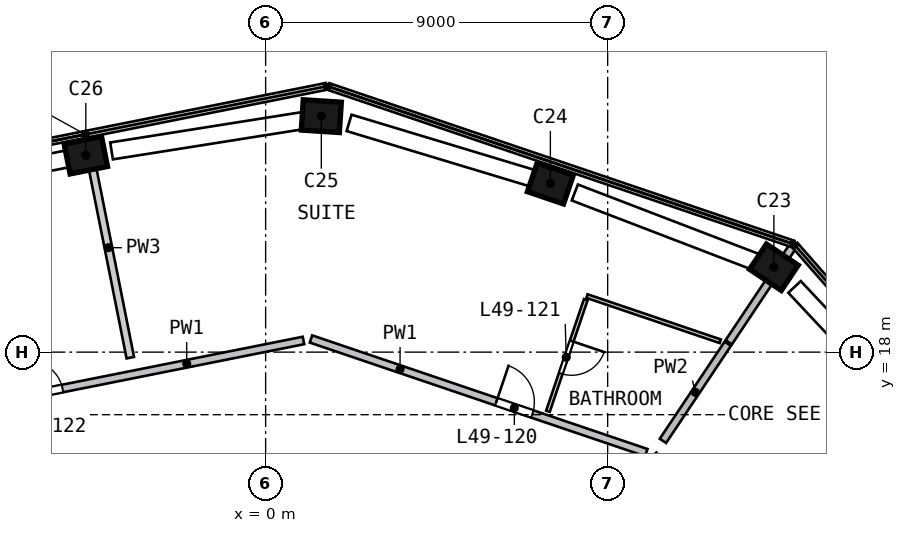
"""IFC4 building model, lengths in metres.
Left out: names, types, materials, properties, quantities, classifications, styles, units other than length and angle.
Written with IfcOpenShell. Run it as: python <this file> out.ifc"""

import sys

from ifc_helpers import new_model, si_unit, direction, frame, frame_2d, origin, origin_2d, place, context, subcontext, project, spatial, rectangle, extrude, element, fill, save


model = new_model("IFC4")
c1 = context("Model", 3, precision=1e-05, world=origin(), true_north=direction((0.0, 1.0)))
c2 = subcontext(c1, "Body", "Model", "MODEL_VIEW")
j1 = project(units=[si_unit("LENGTHUNIT", "METRE"), si_unit("PLANEANGLEUNIT", "RADIAN")], contexts=[c1])
p1 = place(None, origin())
s1 = spatial("IfcSite", under=j1, at=p1, CompositionType="ELEMENT")
p2 = place(p1, origin())
s2 = spatial("IfcBuilding", under=s1, at=p2, CompositionType="ELEMENT")
p3 = place(p2, frame((0.0, 0.0, 201.0)))
s3 = spatial("IfcBuildingStorey", under=s2, at=p3, CompositionType="ELEMENT", Elevation=201.0)
p4 = place(p3, frame((13.465, 20.174, 0.0), z_axis=(-0.075209821, 0.049269396, 0.995949803), x_axis=(0.828464484, -0.552777696, 0.089907833)))
e1 = element("IfcColumn", 1, at=p4, inside=s3, PredefinedType="COLUMN", context=c2, shape_type="SweptSolid", body=[
    extrude(rectangle(XDim=1.0, YDim=0.8, at=origin_2d()), origin(), (0.0, 0.0, 1.0), 4.207),
])
p5 = place(p3, frame((7.593, 22.407, 0.0), z_axis=(-0.083350423, 0.027454561, 0.996142035), x_axis=(-0.943472661, 0.319622961, -0.0877525)))
e2 = element("IfcColumn", 2, at=p5, inside=s3, PredefinedType="COLUMN", context=c2, shape_type="SweptSolid", body=[
    extrude(rectangle(XDim=1.0, YDim=0.8, at=origin_2d()), origin(), (0.0, 0.0, 1.0), 4.206),
])
p6 = place(p3, frame((1.574, 24.204, 0.0), z_axis=(-0.089833403, 0.005106808, 0.995943713), x_axis=(0.993825699, -0.064922521, 0.089975257)))
e3 = element("IfcColumn", 3, at=p6, inside=s3, PredefinedType="COLUMN", context=c2, shape_type="SweptSolid", body=[
    extrude(rectangle(XDim=1.0, YDim=0.8, at=origin_2d()), origin(), (0.0, 0.0, 1.0), 4.207),
])
p7 = place(p3, frame((-4.628, 23.201, 0.0), z_axis=(-0.085904417, -0.017877406, 0.996142976), x_axis=(-0.976927418, -0.194715676, -0.087741814)))
e4 = element("IfcColumn", 4, at=p7, inside=s3, PredefinedType="COLUMN", context=c2, shape_type="SweptSolid", body=[
    extrude(rectangle(XDim=1.0, YDim=0.8, at=origin_2d()), origin(), (0.0, 0.0, 1.0), 4.206),
])
p8 = place(p3, frame((-8.14, 16.485, 0.0), z_axis=(0.0, 0.0, 1.0), x_axis=(0.980682347, 0.195607093, 0.0)))
e5 = element("IfcWall", 5, at=p8, inside=s3, PredefinedType="SOLIDWALL", context=c2, shape_type="SweptSolid", body=[
    extrude(rectangle(XDim=9.316, YDim=0.2, at=frame_2d((4.658, 0.0))), origin(), (0.0, 0.0, 1.0), 4.19),
])
p9 = place(p8, frame((1.95, 0.0, 0.0)))
e6 = element("IfcOpeningElement", 6, at=p9, cuts=e5, PredefinedType="OPENING", context=c2, shape_type="SweptSolid", body=[
    extrude(rectangle(XDim=0.9, YDim=2.1, at=frame_2d((0.45, 1.05))), frame((0.0, 0.11, 0.0), z_axis=(0.0, -1.0, 0.0), x_axis=(1.0, 0.0, 0.0)), (0.0, 0.0, 1.0), 0.22),
])
p10 = place(p3, frame((1.193, 18.346, 0.0), z_axis=(0.0, 0.0, 1.0), x_axis=(0.947096531, -0.320948844, 0.0)))
e7 = element("IfcWall", 7, at=p10, inside=s3, PredefinedType="SOLIDWALL", context=c2, shape_type="SweptSolid", body=[
    extrude(rectangle(XDim=9.316, YDim=0.2, at=frame_2d((4.658, 0.0))), origin(), (0.0, 0.0, 1.0), 4.19),
])
p11 = place(p10, frame((5.15, 0.0, 0.0)))
e8 = element("IfcOpeningElement", 8, at=p11, cuts=e7, PredefinedType="OPENING", context=c2, shape_type="SweptSolid", body=[
    extrude(rectangle(XDim=1.0, YDim=2.1, at=frame_2d((0.5, 1.05))), frame((0.0, 0.11, 0.0), z_axis=(0.0, -1.0, 0.0), x_axis=(1.0, 0.0, 0.0)), (0.0, 0.0, 1.0), 0.22),
])
p12 = place(p3, frame((10.206, 15.292, 0.0), z_axis=(0.0, 0.0, 1.0), x_axis=(0.659731878, -0.751501064, 0.0)))
e9 = element("IfcWall", 9, at=p12, inside=s3, PredefinedType="SOLIDWALL", context=c2, shape_type="SweptSolid", body=[
    extrude(rectangle(XDim=9.317, YDim=0.2, at=frame_2d((4.658, 0.0))), origin(), (0.0, 0.0, 1.0), 4.19),
])
p13 = place(p12, frame((5.15, 0.0, 0.0)))
e10 = element("IfcOpeningElement", 10, at=p13, cuts=e9, PredefinedType="OPENING", context=c2, shape_type="SweptSolid", body=[
    extrude(rectangle(XDim=1.0, YDim=2.1, at=frame_2d((0.5, 1.05))), frame((0.0, 0.11, 0.0), z_axis=(0.0, -1.0, 0.0), x_axis=(1.0, 0.0, 0.0)), (0.0, 0.0, 1.0), 0.22),
])
p14 = place(p3, frame((10.454, 15.664, 0.0), z_axis=(0.0, 0.0, 1.0), x_axis=(0.555121583, 0.831769215, 0.0)))
e11 = element("IfcWall", 11, at=p14, inside=s3, PredefinedType="SOLIDWALL", context=c2, shape_type="SweptSolid", body=[
    extrude(rectangle(XDim=3.075, YDim=0.2, at=frame_2d((1.537, 0.0))), origin(), (0.0, 0.0, 1.0), 4.19),
])
p15 = place(p3, frame((12.187, 18.259, 0.0), z_axis=(0.0, 0.0, 1.0), x_axis=(0.555093017, 0.83178828, 0.0)))
e12 = element("IfcWall", 12, at=p15, inside=s3, PredefinedType="SOLIDWALL", context=c2, shape_type="SweptSolid", body=[
    extrude(rectangle(XDim=3.011, YDim=0.2, at=frame_2d((1.506, 0.0))), origin(), (0.0, 0.0, 1.0), 4.19),
])
p16 = place(p3, frame((8.424, 19.38, 0.0), z_axis=(0.0, 0.0, 1.0), x_axis=(-0.320949479, -0.947096316, 0.0)))
e13 = element("IfcWall", 13, at=p16, inside=s3, PredefinedType="PARTITIONING", context=c2, shape_type="SweptSolid", body=[
    extrude(rectangle(XDim=3.1, YDim=0.1, at=frame_2d((1.55, 0.0))), origin(), (0.0, 0.0, 1.0), 4.19),
])
p17 = place(p16, frame((1.15, 0.0, 0.0)))
e14 = element("IfcOpeningElement", 14, at=p17, cuts=e13, PredefinedType="OPENING", context=c2, shape_type="SweptSolid", body=[
    extrude(rectangle(XDim=0.9, YDim=2.1, at=frame_2d((0.45, 1.05))), frame((0.0, 0.06, 0.0), z_axis=(0.0, -1.0, 0.0), x_axis=(1.0, 0.0, 0.0)), (0.0, 0.0, 1.0), 0.12),
])
p18 = place(p3, frame((8.456, 19.475, 0.0), z_axis=(0.0, 0.0, 1.0), x_axis=(0.947109685, -0.320910025, 0.0)))
e15 = element("IfcWall", 15, at=p18, inside=s3, PredefinedType="PARTITIONING", context=c2, shape_type="SweptSolid", body=[
    extrude(rectangle(XDim=3.704, YDim=0.1, at=frame_2d((1.852, 0.0))), origin(), (0.0, 0.0, 1.0), 4.19),
])
p19 = place(p3, frame((-4.716, 23.643, 0.0), z_axis=(0.0, 0.0, 1.0), x_axis=(0.195638866, -0.980676009, 0.0)))
e16 = element("IfcWall", 16, at=p19, inside=s3, PredefinedType="SOLIDWALL", context=c2, shape_type="SweptSolid", body=[
    extrude(rectangle(XDim=5.903, YDim=0.2, at=frame_2d((2.951, 0.0))), origin(), (0.0, 0.0, 1.0), 4.19),
])
p20 = place(p11, origin())
e17 = element("IfcDoor", 17, at=p20, inside=s3, OperationType="SINGLE_SWING_LEFT", PredefinedType="DOOR", context=c2, shape_type="SweptSolid", body=[
    extrude(rectangle(XDim=1.0, YDim=2.1, at=frame_2d((0.5, 1.05))), frame((0.0, 0.025, 0.0), z_axis=(0.0, -1.0, 0.0), x_axis=(1.0, 0.0, 0.0)), (0.0, 0.0, 1.0), 0.05),
])
fill(e8, e17)
p21 = place(p17, origin())
e18 = element("IfcDoor", 18, at=p21, inside=s3, OperationType="SINGLE_SWING_LEFT", PredefinedType="DOOR", context=c2, shape_type="SweptSolid", body=[
    extrude(rectangle(XDim=0.9, YDim=2.1, at=frame_2d((0.45, 1.05))), frame((0.0, 0.025, 0.0), z_axis=(0.0, -1.0, 0.0), x_axis=(1.0, 0.0, 0.0)), (0.0, 0.0, 1.0), 0.05),
])
fill(e14, e18)
p22 = place(p9, origin())
e19 = element("IfcDoor", 19, at=p22, inside=s3, OperationType="SINGLE_SWING_LEFT", PredefinedType="DOOR", context=c2, shape_type="SweptSolid", body=[
    extrude(rectangle(XDim=0.9, YDim=2.1, at=frame_2d((0.45, 1.05))), frame((0.0, 0.025, 0.0), z_axis=(0.0, -1.0, 0.0), x_axis=(1.0, 0.0, 0.0)), (0.0, 0.0, 1.0), 0.05),
])
fill(e6, e19)
save(model, sys.argv[1])
